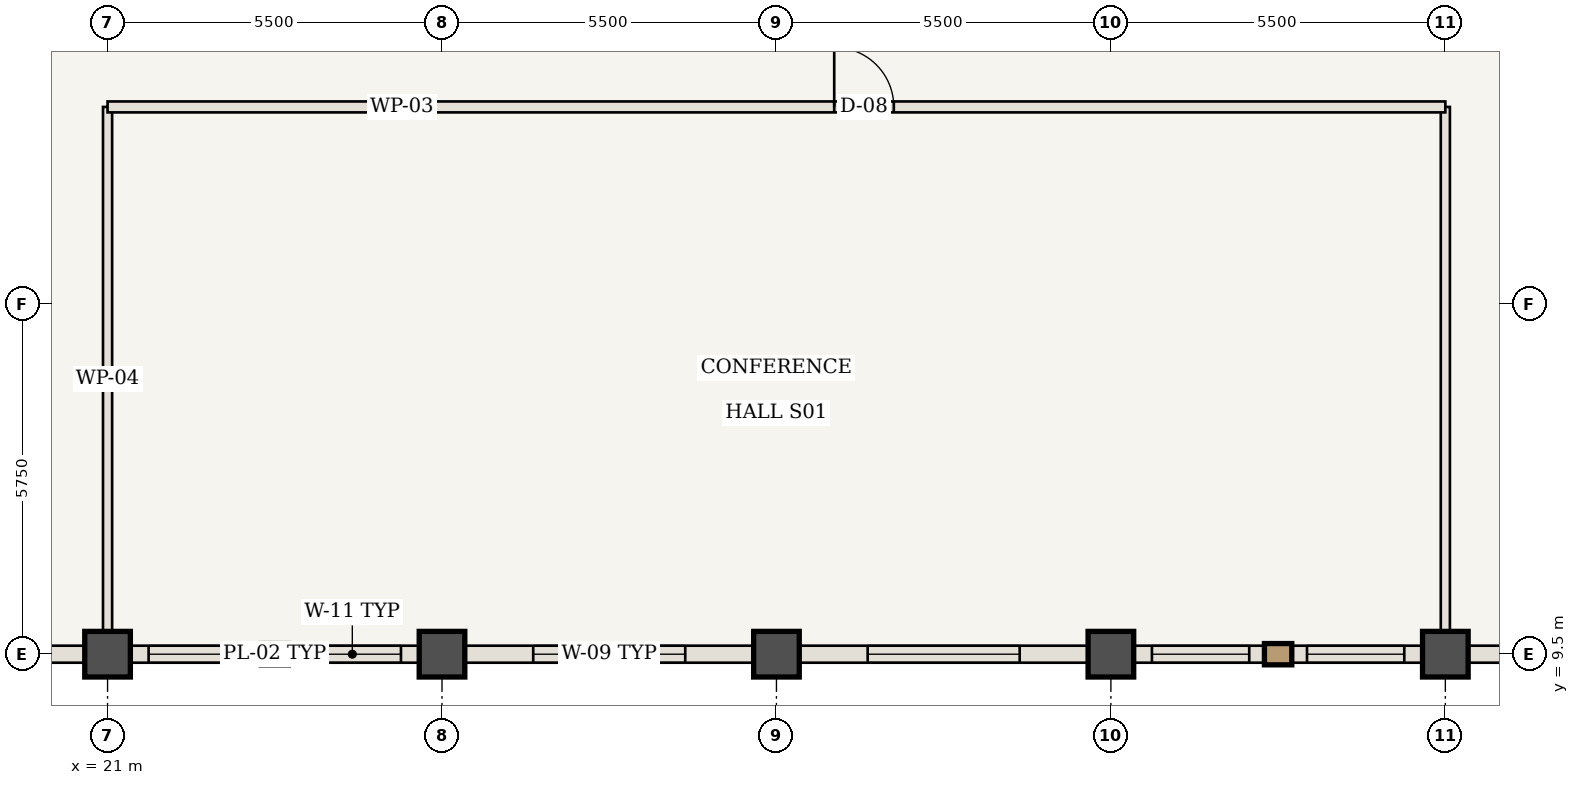
"""IFC4 building model, lengths in metres.
Left out: names, types, materials, properties, quantities, classifications, styles, units other than length and angle.
Written with IfcOpenShell. Run it as: python <this file> out.ifc"""

import sys

from ifc_helpers import new_model, si_unit, direction, frame, frame_2d, origin, origin_2d, place, context, subcontext, project, spatial, rectangle, extrude, element, fill, save


model = new_model("IFC4")
c1 = context("Model", 3, precision=1e-05, world=origin(), true_north=direction((0.0, 1.0)))
c2 = subcontext(c1, "Body", "Model", "MODEL_VIEW")
j1 = project(units=[si_unit("LENGTHUNIT", "METRE"), si_unit("PLANEANGLEUNIT", "RADIAN")], contexts=[c1])
p1 = place(None, origin())
s1 = spatial("IfcSite", under=j1, at=p1, CompositionType="ELEMENT")
p2 = place(p1, origin())
s2 = spatial("IfcBuilding", under=s1, at=p2, CompositionType="ELEMENT")
p3 = place(p2, frame((0.0, 0.0, 273.7)))
s3 = spatial("IfcBuildingStorey", under=s2, at=p3, CompositionType="ELEMENT", Elevation=273.7)
for number, where, z_axis, x_axis in (
    (1, (21.0, 9.5, 0.0), (0.0, 0.0, 1.0), (1.0, 0.0, 0.0)),
    (2, (26.5, 9.5, 0.0), (0.0, 0.0, 1.0), (1.0, 0.0, 0.0)),
    (3, (32.0, 9.5, 0.0), (0.0, 0.0, 1.0), (1.0, 0.0, 0.0)),
    (4, (37.5, 9.5, 0.0), (0.0, 0.0, 1.0), (1.0, 0.0, 0.0)),
    (5, (43.0, 9.5, 0.0), (0.0, 0.0, 1.0), (1.0, 0.0, 0.0)),
):
    element("IfcColumn", number, at=place(p3, frame(where, z_axis=z_axis, x_axis=x_axis)), inside=s3, PredefinedType="COLUMN", context=c2, shape_type="SweptSolid", body=[
        extrude(rectangle(XDim=0.75, YDim=0.75, at=origin_2d()), origin(), (0.0, 0.0, 1.0), 3.85),
    ])
for number, where, z_axis, x_axis in (
    (6, (21.0, 9.56, 0.0), (0.0, 0.0, 1.0), (0.0, 1.0, 0.0)),
    (7, (43.0, 9.56, 0.0), (0.0, 0.0, 1.0), (0.0, 1.0, 0.0)),
):
    element("IfcWall", number, at=place(p3, frame(where, z_axis=z_axis, x_axis=x_axis)), inside=s3, PredefinedType="STANDARD", context=c2, shape_type="SweptSolid", body=[
        extrude(rectangle(XDim=8.94, YDim=0.15, at=frame_2d((4.47, 0.0))), origin(), (0.0, 0.0, 1.0), 3.685),
    ])
p4 = place(p3, frame((21.0, 18.5, 0.0), z_axis=(0.0, 0.0, 1.0), x_axis=(1.0, 0.0, 0.0)))
e8 = element("IfcWall", 8, at=p4, inside=s3, PredefinedType="STANDARD", context=c2, shape_type="SweptSolid", body=[
    extrude(rectangle(XDim=22.0, YDim=0.18, at=frame_2d((11.0, 0.0))), origin(), (0.0, 0.0, 1.0), 3.685),
])
p5 = place(p4, frame((11.95, 0.0, 0.0)))
e9 = element("IfcOpeningElement", 9, at=p5, cuts=e8, PredefinedType="OPENING", context=c2, shape_type="SweptSolid", body=[
    extrude(rectangle(XDim=0.98, YDim=2.2, at=frame_2d((0.49, 1.1))), frame((0.0, 0.1, 0.0), z_axis=(0.0, -1.0, 0.0), x_axis=(1.0, 0.0, 0.0)), (0.0, 0.0, 1.0), 0.2),
])
p6 = place(p3, frame((21.0, 9.5, 0.0), z_axis=(0.0, 0.0, 1.0), x_axis=(-1.0, 0.0, 0.0)))
e10 = element("IfcWall", 10, at=p6, inside=s3, PredefinedType="USERDEFINED", context=c2, shape_type="SweptSolid", body=[
    extrude(rectangle(XDim=5.5, YDim=0.28, at=frame_2d((2.75, 0.0))), origin(), (0.0, 0.0, 1.0), 2.985),
])
p7 = place(p3, frame((26.5, 9.5, 0.0), z_axis=(0.0, 0.0, 1.0), x_axis=(-1.0, 0.0, 0.0)))
e11 = element("IfcWall", 11, at=p7, inside=s3, PredefinedType="USERDEFINED", context=c2, shape_type="SweptSolid", body=[
    extrude(rectangle(XDim=5.5, YDim=0.28, at=frame_2d((2.75, 0.0))), origin(), (0.0, 0.0, 1.0), 2.985),
])
p8 = place(p7, frame((0.675, 0.0, 0.85)))
e12 = element("IfcOpeningElement", 12, at=p8, cuts=e11, PredefinedType="OPENING", context=c2, shape_type="SweptSolid", body=[
    extrude(rectangle(XDim=1.6, YDim=1.935, at=frame_2d((0.8, 0.968))), frame((0.0, 0.15, 0.0), z_axis=(0.0, -1.0, 0.0), x_axis=(1.0, 0.0, 0.0)), (0.0, 0.0, 1.0), 0.3),
])
p9 = place(p7, frame((3.225, 0.0, 0.85)))
e13 = element("IfcOpeningElement", 13, at=p9, cuts=e11, PredefinedType="OPENING", context=c2, shape_type="SweptSolid", body=[
    extrude(rectangle(XDim=1.6, YDim=1.935, at=frame_2d((0.8, 0.968))), frame((0.0, 0.15, 0.0), z_axis=(0.0, -1.0, 0.0), x_axis=(1.0, 0.0, 0.0)), (0.0, 0.0, 1.0), 0.3),
])
p10 = place(p3, frame((32.0, 9.5, 0.0), z_axis=(0.0, 0.0, 1.0), x_axis=(-1.0, 0.0, 0.0)))
e14 = element("IfcWall", 14, at=p10, inside=s3, PredefinedType="USERDEFINED", context=c2, shape_type="SweptSolid", body=[
    extrude(rectangle(XDim=5.5, YDim=0.28, at=frame_2d((2.75, 0.0))), origin(), (0.0, 0.0, 1.0), 2.985),
])
p11 = place(p10, frame((1.5, 0.0, 0.85)))
e15 = element("IfcOpeningElement", 15, at=p11, cuts=e14, PredefinedType="OPENING", context=c2, shape_type="SweptSolid", body=[
    extrude(rectangle(XDim=2.5, YDim=1.935, at=frame_2d((1.25, 0.968))), frame((0.0, 0.15, 0.0), z_axis=(0.0, -1.0, 0.0), x_axis=(1.0, 0.0, 0.0)), (0.0, 0.0, 1.0), 0.3),
])
p12 = place(p3, frame((37.5, 9.5, 0.0), z_axis=(0.0, 0.0, 1.0), x_axis=(-1.0, 0.0, 0.0)))
e16 = element("IfcWall", 16, at=p12, inside=s3, PredefinedType="USERDEFINED", context=c2, shape_type="SweptSolid", body=[
    extrude(rectangle(XDim=5.5, YDim=0.28, at=frame_2d((2.75, 0.0))), origin(), (0.0, 0.0, 1.0), 2.985),
])
p13 = place(p12, frame((1.5, 0.0, 0.85)))
e17 = element("IfcOpeningElement", 17, at=p13, cuts=e16, PredefinedType="OPENING", context=c2, shape_type="SweptSolid", body=[
    extrude(rectangle(XDim=2.5, YDim=1.935, at=frame_2d((1.25, 0.968))), frame((0.0, 0.15, 0.0), z_axis=(0.0, -1.0, 0.0), x_axis=(1.0, 0.0, 0.0)), (0.0, 0.0, 1.0), 0.3),
])
p14 = place(p3, frame((43.0, 9.5, 0.0), z_axis=(0.0, 0.0, 1.0), x_axis=(-1.0, 0.0, 0.0)))
e18 = element("IfcWall", 18, at=p14, inside=s3, PredefinedType="USERDEFINED", context=c2, shape_type="SweptSolid", body=[
    extrude(rectangle(XDim=5.5, YDim=0.28, at=frame_2d((2.75, 0.0))), origin(), (0.0, 0.0, 1.0), 2.985),
])
p15 = place(p14, frame((0.675, 0.0, 0.85)))
e19 = element("IfcOpeningElement", 19, at=p15, cuts=e18, PredefinedType="OPENING", context=c2, shape_type="SweptSolid", body=[
    extrude(rectangle(XDim=1.6, YDim=1.935, at=frame_2d((0.8, 0.968))), frame((0.0, 0.15, 0.0), z_axis=(0.0, -1.0, 0.0), x_axis=(1.0, 0.0, 0.0)), (0.0, 0.0, 1.0), 0.3),
])
p16 = place(p14, frame((3.225, 0.0, 0.85)))
e20 = element("IfcOpeningElement", 20, at=p16, cuts=e18, PredefinedType="OPENING", context=c2, shape_type="SweptSolid", body=[
    extrude(rectangle(XDim=1.6, YDim=1.935, at=frame_2d((0.8, 0.968))), frame((0.0, 0.15, 0.0), z_axis=(0.0, -1.0, 0.0), x_axis=(1.0, 0.0, 0.0)), (0.0, 0.0, 1.0), 0.3),
])
p17 = place(p3, frame((48.5, 9.5, 0.0), z_axis=(0.0, 0.0, 1.0), x_axis=(-1.0, 0.0, 0.0)))
e21 = element("IfcWall", 21, at=p17, inside=s3, PredefinedType="USERDEFINED", context=c2, shape_type="SweptSolid", body=[
    extrude(rectangle(XDim=5.5, YDim=0.28, at=frame_2d((2.75, 0.0))), origin(), (0.0, 0.0, 1.0), 2.985),
])
p18 = place(p5, origin())
e22 = element("IfcDoor", 22, at=p18, inside=s3, OperationType="SINGLE_SWING_LEFT", PredefinedType="DOOR", context=c2, shape_type="SweptSolid", body=[
    extrude(rectangle(XDim=0.98, YDim=2.2, at=frame_2d((0.49, 1.1))), frame((0.0, 0.025, 0.0), z_axis=(0.0, -1.0, 0.0), x_axis=(1.0, 0.0, 0.0)), (0.0, 0.0, 1.0), 0.05),
])
fill(e9, e22)
p19 = place(p8, origin())
e23 = element("IfcWindow", 23, at=p19, inside=s3, PartitioningType="SINGLE_PANEL", PredefinedType="WINDOW", context=c2, shape_type="SweptSolid", body=[
    extrude(rectangle(XDim=1.6, YDim=1.935, at=frame_2d((0.8, 0.968))), frame((0.0, 0.03, 0.0), z_axis=(0.0, -1.0, 0.0), x_axis=(1.0, 0.0, 0.0)), (0.0, 0.0, 1.0), 0.06),
])
fill(e12, e23)
p20 = place(p9, origin())
e24 = element("IfcWindow", 24, at=p20, inside=s3, PartitioningType="SINGLE_PANEL", PredefinedType="WINDOW", context=c2, shape_type="SweptSolid", body=[
    extrude(rectangle(XDim=1.6, YDim=1.935, at=frame_2d((0.8, 0.968))), frame((0.0, 0.03, 0.0), z_axis=(0.0, -1.0, 0.0), x_axis=(1.0, 0.0, 0.0)), (0.0, 0.0, 1.0), 0.06),
])
fill(e13, e24)
p21 = place(p11, origin())
e25 = element("IfcWindow", 25, at=p21, inside=s3, PartitioningType="SINGLE_PANEL", PredefinedType="WINDOW", context=c2, shape_type="SweptSolid", body=[
    extrude(rectangle(XDim=2.5, YDim=1.935, at=frame_2d((1.25, 0.968))), frame((0.0, 0.03, 0.0), z_axis=(0.0, -1.0, 0.0), x_axis=(1.0, 0.0, 0.0)), (0.0, 0.0, 1.0), 0.06),
])
fill(e15, e25)
p22 = place(p13, origin())
e26 = element("IfcWindow", 26, at=p22, inside=s3, PartitioningType="SINGLE_PANEL", PredefinedType="WINDOW", context=c2, shape_type="SweptSolid", body=[
    extrude(rectangle(XDim=2.5, YDim=1.935, at=frame_2d((1.25, 0.968))), frame((0.0, 0.03, 0.0), z_axis=(0.0, -1.0, 0.0), x_axis=(1.0, 0.0, 0.0)), (0.0, 0.0, 1.0), 0.06),
])
fill(e17, e26)
p23 = place(p15, origin())
e27 = element("IfcWindow", 27, at=p23, inside=s3, PartitioningType="SINGLE_PANEL", PredefinedType="WINDOW", context=c2, shape_type="SweptSolid", body=[
    extrude(rectangle(XDim=1.6, YDim=1.935, at=frame_2d((0.8, 0.968))), frame((0.0, 0.03, 0.0), z_axis=(0.0, -1.0, 0.0), x_axis=(1.0, 0.0, 0.0)), (0.0, 0.0, 1.0), 0.06),
])
fill(e19, e27)
p24 = place(p16, origin())
e28 = element("IfcWindow", 28, at=p24, inside=s3, PartitioningType="SINGLE_PANEL", PredefinedType="WINDOW", context=c2, shape_type="SweptSolid", body=[
    extrude(rectangle(XDim=1.6, YDim=1.935, at=frame_2d((0.8, 0.968))), frame((0.0, 0.03, 0.0), z_axis=(0.0, -1.0, 0.0), x_axis=(1.0, 0.0, 0.0)), (0.0, 0.0, 1.0), 0.06),
])
fill(e20, e28)
save(model, sys.argv[1])
